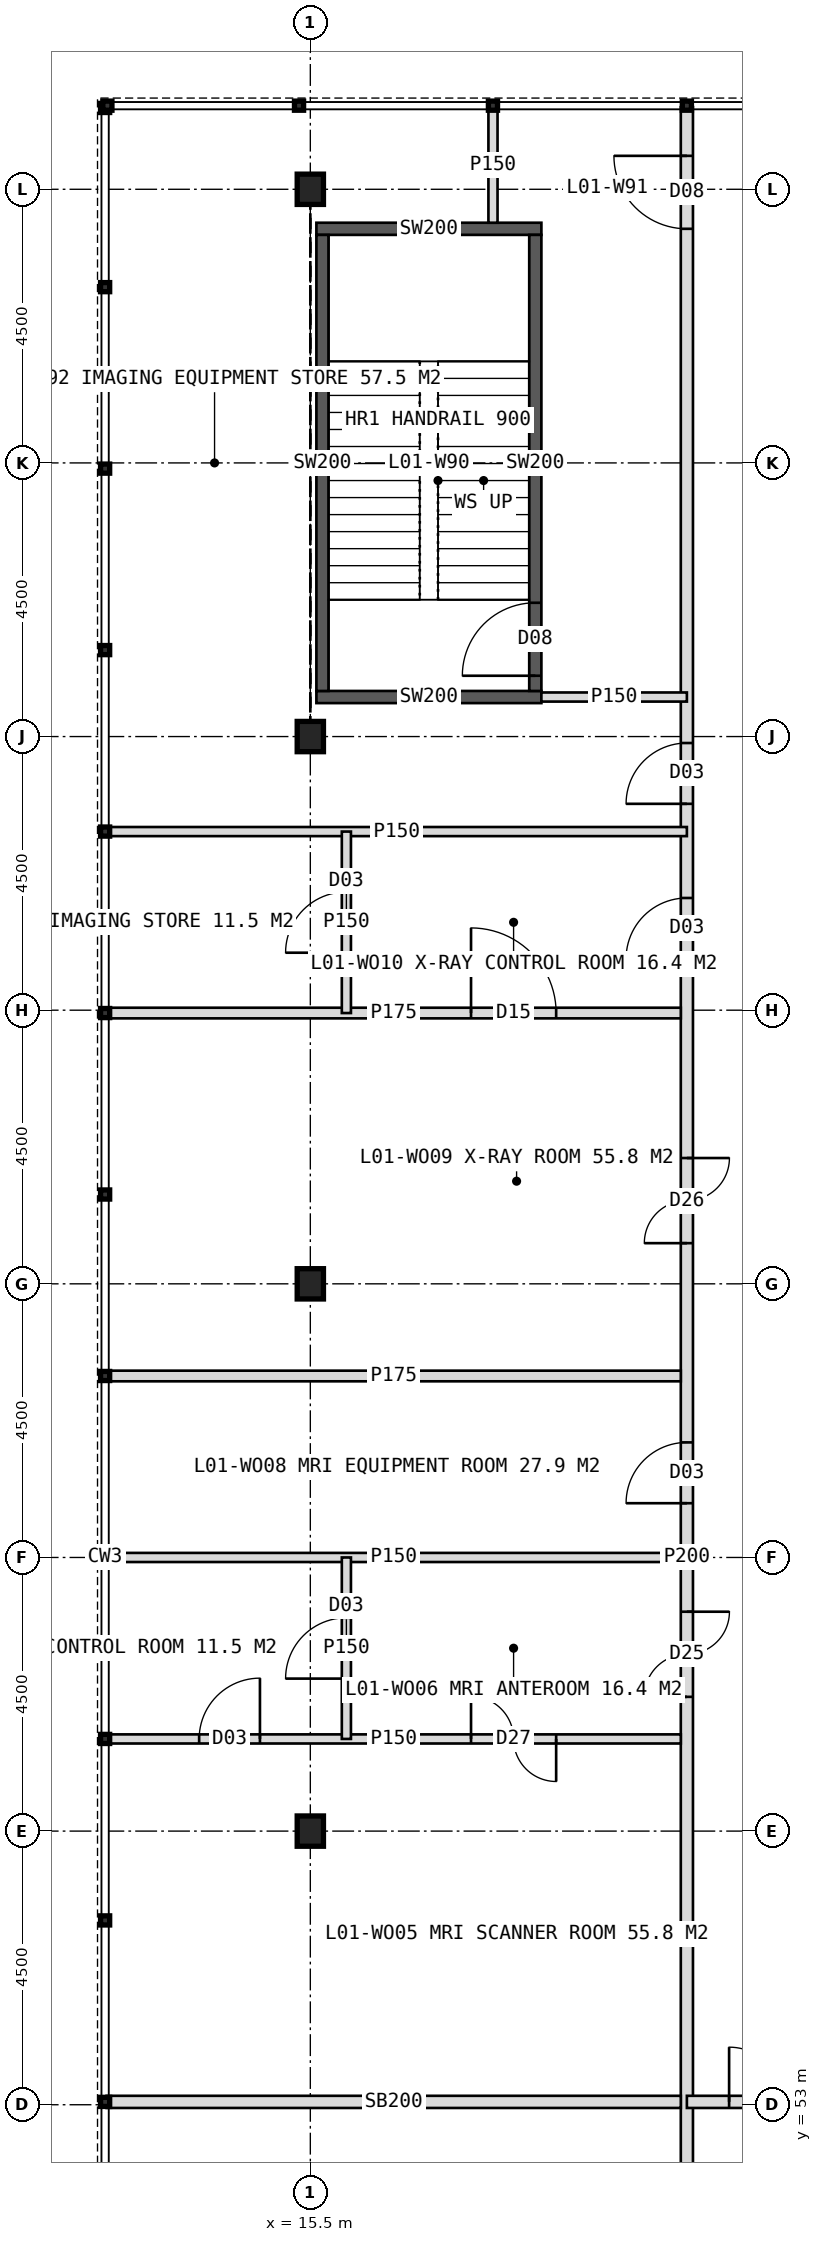
"""IFC4 building model, lengths in metres.
Left out: names, types, materials, properties, quantities, classifications, styles, units other than length and angle.
Written with IfcOpenShell. Run it as: python <this file> out.ifc"""

import sys

from ifc_helpers import new_model, si_unit, direction, frame, frame_2d, origin, origin_2d, place, context, subcontext, project, spatial, rectangle, i_section, extrude, element, fill, save


model = new_model("IFC4")
c1 = context("Model", 3, precision=1e-05, world=origin(), true_north=direction((0.0, 1.0)))
c2 = subcontext(c1, "Body", "Model", "MODEL_VIEW")
j1 = project(units=[si_unit("LENGTHUNIT", "METRE"), si_unit("PLANEANGLEUNIT", "RADIAN")], contexts=[c1])
p1 = place(None, origin())
s1 = spatial("IfcSite", under=j1, at=p1, CompositionType="ELEMENT")
p2 = place(p1, origin())
s2 = spatial("IfcBuilding", under=s1, at=p2, CompositionType="ELEMENT")
p3 = place(p2, frame((0.0, 0.0, 6.0)))
s3 = spatial("IfcBuildingStorey", under=s2, at=p3, CompositionType="ELEMENT", Elevation=6.0)
for number, where, z_axis, x_axis in (
    (1, (15.5, 57.5, 0.0), (0.0, 0.0, 1.0), (1.0, 0.0, 0.0)),
    (2, (15.5, 66.5, 0.0), (0.0, 0.0, 1.0), (1.0, 0.0, 0.0)),
    (3, (15.5, 75.5, 0.0), (0.0, 0.0, 1.0), (1.0, 0.0, 0.0)),
    (4, (15.5, 84.5, 0.0), (0.0, 0.0, 1.0), (1.0, 0.0, 0.0)),
):
    element("IfcColumn", number, at=place(p3, frame(where, z_axis=z_axis, x_axis=x_axis)), inside=s3, PredefinedType="COLUMN", context=c2, shape_type="SweptSolid", body=[
        extrude(i_section(OverallWidth=0.432, OverallDepth=0.498, WebThickness=0.056, FlangeThickness=0.089, FilletRadius=0.015, at=origin_2d()), origin(), (0.0, 0.0, 1.0), 5.0),
    ])
p4 = place(p3, frame((21.693, 38.15, 0.0), z_axis=(0.0, 0.0, 1.0), x_axis=(0.0, 1.0, 0.0)))
e5 = element("IfcWall", 5, at=p4, inside=s3, PredefinedType="PARTITIONING", context=c2, shape_type="SweptSolid", body=[
    extrude(rectangle(XDim=47.7, YDim=0.2, at=frame_2d((23.85, 0.0))), origin(), (0.0, 0.0, 1.0), 4.7),
])
p5 = place(p4, frame((45.7, 0.0, 0.0)))
e6 = element("IfcOpeningElement", 6, at=p5, cuts=e5, PredefinedType="OPENING", context=c2, shape_type="SweptSolid", body=[
    extrude(rectangle(XDim=1.2, YDim=2.1, at=frame_2d((0.6, 1.05))), frame((0.0, 0.11, 0.0), z_axis=(0.0, -1.0, 0.0), x_axis=(1.0, 0.0, 0.0)), (0.0, 0.0, 1.0), 0.22),
])
p6 = place(p4, frame((36.244, 0.0, 0.0)))
e7 = element("IfcOpeningElement", 7, at=p6, cuts=e5, PredefinedType="OPENING", context=c2, shape_type="SweptSolid", body=[
    extrude(rectangle(XDim=1.0, YDim=2.1, at=frame_2d((0.5, 1.05))), frame((0.0, 0.11, 0.0), z_axis=(0.0, -1.0, 0.0), x_axis=(1.0, 0.0, 0.0)), (0.0, 0.0, 1.0), 0.22),
])
p7 = place(p4, frame((2.222, 0.0, 0.0)))
e8 = element("IfcOpeningElement", 8, at=p7, cuts=e5, PredefinedType="OPENING", context=c2, shape_type="SweptSolid", body=[
    extrude(rectangle(XDim=1.4, YDim=2.2, at=frame_2d((0.7, 1.1))), frame((0.0, 0.11, 0.0), z_axis=(0.0, -1.0, 0.0), x_axis=(1.0, 0.0, 0.0)), (0.0, 0.0, 1.0), 0.22),
])
p8 = place(p4, frame((6.836, 0.0, 0.0)))
e9 = element("IfcOpeningElement", 9, at=p8, cuts=e5, PredefinedType="OPENING", context=c2, shape_type="SweptSolid", body=[
    extrude(rectangle(XDim=1.0, YDim=2.1, at=frame_2d((0.5, 1.05))), frame((0.0, 0.11, 0.0), z_axis=(0.0, -1.0, 0.0), x_axis=(1.0, 0.0, 0.0)), (0.0, 0.0, 1.0), 0.22),
])
p9 = place(p4, frame((11.113, 0.0, 0.0)))
e10 = element("IfcOpeningElement", 10, at=p9, cuts=e5, PredefinedType="OPENING", context=c2, shape_type="SweptSolid", body=[
    extrude(rectangle(XDim=1.4, YDim=2.2, at=frame_2d((0.7, 1.1))), frame((0.0, 0.11, 0.0), z_axis=(0.0, -1.0, 0.0), x_axis=(1.0, 0.0, 0.0)), (0.0, 0.0, 1.0), 0.22),
])
p10 = place(p4, frame((21.558, 0.0, 0.0)))
e11 = element("IfcOpeningElement", 11, at=p10, cuts=e5, PredefinedType="OPENING", context=c2, shape_type="SweptSolid", body=[
    extrude(rectangle(XDim=1.4, YDim=2.2, at=frame_2d((0.7, 1.1))), frame((0.0, 0.11, 0.0), z_axis=(0.0, -1.0, 0.0), x_axis=(1.0, 0.0, 0.0)), (0.0, 0.0, 1.0), 0.22),
])
p11 = place(p4, frame((24.742, 0.0, 0.0)))
e12 = element("IfcOpeningElement", 12, at=p11, cuts=e5, PredefinedType="OPENING", context=c2, shape_type="SweptSolid", body=[
    extrude(rectangle(XDim=1.0, YDim=2.1, at=frame_2d((0.5, 1.05))), frame((0.0, 0.11, 0.0), z_axis=(0.0, -1.0, 0.0), x_axis=(1.0, 0.0, 0.0)), (0.0, 0.0, 1.0), 0.22),
])
p12 = place(p4, frame((29.019, 0.0, 0.0)))
e13 = element("IfcOpeningElement", 13, at=p12, cuts=e5, PredefinedType="OPENING", context=c2, shape_type="SweptSolid", body=[
    extrude(rectangle(XDim=1.4, YDim=2.2, at=frame_2d((0.7, 1.1))), frame((0.0, 0.11, 0.0), z_axis=(0.0, -1.0, 0.0), x_axis=(1.0, 0.0, 0.0)), (0.0, 0.0, 1.0), 0.22),
])
p13 = place(p4, frame((33.695, 0.0, 0.0)))
e14 = element("IfcOpeningElement", 14, at=p13, cuts=e5, PredefinedType="OPENING", context=c2, shape_type="SweptSolid", body=[
    extrude(rectangle(XDim=1.0, YDim=2.1, at=frame_2d((0.5, 1.05))), frame((0.0, 0.11, 0.0), z_axis=(0.0, -1.0, 0.0), x_axis=(1.0, 0.0, 0.0)), (0.0, 0.0, 1.0), 0.22),
])
p14 = place(p3, frame((21.693, 53.047, 0.0), z_axis=(0.0, 0.0, 1.0), x_axis=(1.0, 0.0, 0.0)))
e15 = element("IfcWall", 15, at=p14, inside=s3, PredefinedType="SOLIDWALL", context=c2, shape_type="SweptSolid", body=[
    extrude(rectangle(XDim=3.189, YDim=0.2, at=frame_2d((1.594, 0.0))), origin(), (0.0, 0.0, 1.0), 4.7),
])
p15 = place(p14, frame((0.695, 0.0, 0.0)))
e16 = element("IfcOpeningElement", 16, at=p15, cuts=e15, PredefinedType="OPENING", context=c2, shape_type="SweptSolid", body=[
    extrude(rectangle(XDim=1.8, YDim=2.2, at=frame_2d((0.9, 1.1))), frame((0.0, 0.11, 0.0), z_axis=(0.0, -1.0, 0.0), x_axis=(1.0, 0.0, 0.0)), (0.0, 0.0, 1.0), 0.22),
])
for number, where, z_axis, x_axis in (
    (17, (15.6, 76.15, 0.0), (0.0, 0.0, 1.0), (1.0, 0.0, 0.0)),
    (18, (15.6, 83.85, 0.0), (0.0, 0.0, 1.0), (1.0, 0.0, 0.0)),
):
    element("IfcWall", number, at=place(p3, frame(where, z_axis=z_axis, x_axis=x_axis)), inside=s3, PredefinedType="SOLIDWALL", context=c2, shape_type="SweptSolid", body=[
        extrude(rectangle(XDim=3.7, YDim=0.2, at=frame_2d((1.85, 0.0))), origin(), (0.0, 0.0, 1.0), 4.7),
    ])
p16 = place(p3, frame((15.7, 76.25, 0.0), z_axis=(0.0, 0.0, 1.0), x_axis=(0.0, 1.0, 0.0)))
e19 = element("IfcWall", 19, at=p16, inside=s3, PredefinedType="SOLIDWALL", context=c2, shape_type="SweptSolid", body=[
    extrude(rectangle(XDim=7.5, YDim=0.2, at=frame_2d((3.75, 0.0))), origin(), (0.0, 0.0, 1.0), 4.7),
])
p17 = place(p3, frame((19.2, 76.25, 0.0), z_axis=(0.0, 0.0, 1.0), x_axis=(0.0, 1.0, 0.0)))
e20 = element("IfcWall", 20, at=p17, inside=s3, PredefinedType="SOLIDWALL", context=c2, shape_type="SweptSolid", body=[
    extrude(rectangle(XDim=7.5, YDim=0.2, at=frame_2d((3.75, 0.0))), origin(), (0.0, 0.0, 1.0), 4.7),
])
p18 = place(p17, frame((0.25, 0.0, 0.0)))
e21 = element("IfcOpeningElement", 21, at=p18, cuts=e20, PredefinedType="OPENING", context=c2, shape_type="SweptSolid", body=[
    extrude(rectangle(XDim=1.2, YDim=2.1, at=frame_2d((0.6, 1.05))), frame((0.0, 0.11, 0.0), z_axis=(0.0, -1.0, 0.0), x_axis=(1.0, 0.0, 0.0)), (0.0, 0.0, 1.0), 0.22),
])
p19 = place(p3, frame((19.3, 76.15, 0.0), z_axis=(0.0, 0.0, 1.0), x_axis=(1.0, 0.0, 0.0)))
e22 = element("IfcWall", 22, at=p19, inside=s3, PredefinedType="PARTITIONING", context=c2, shape_type="SweptSolid", body=[
    extrude(rectangle(XDim=2.393, YDim=0.15, at=frame_2d((1.197, 0.0))), origin(), (0.0, 0.0, 1.0), 4.7),
])
p20 = place(p3, frame((18.504, 83.95, 0.0), z_axis=(0.0, 0.0, 1.0), x_axis=(0.0, 1.0, 0.0)))
e23 = element("IfcWall", 23, at=p20, inside=s3, PredefinedType="PARTITIONING", context=c2, shape_type="SweptSolid", body=[
    extrude(rectangle(XDim=1.9, YDim=0.15, at=frame_2d((0.95, 0.0))), origin(), (0.0, 0.0, 1.0), 4.7),
])
p21 = place(p3, frame((12.15, 73.938, 0.0), z_axis=(0.0, 0.0, 1.0), x_axis=(1.0, 0.0, 0.0)))
e24 = element("IfcWall", 24, at=p21, inside=s3, PredefinedType="PARTITIONING", context=c2, shape_type="SweptSolid", body=[
    extrude(rectangle(XDim=9.543, YDim=0.15, at=frame_2d((4.771, 0.0))), origin(), (0.0, 0.0, 1.0), 4.7),
])
p22 = place(p3, frame((12.15, 53.047, 0.0), z_axis=(0.0, 0.0, 1.0), x_axis=(1.0, 0.0, 0.0)))
e25 = element("IfcWall", 25, at=p22, inside=s3, PredefinedType="SOLIDWALL", context=c2, shape_type="SweptSolid", body=[
    extrude(rectangle(XDim=9.443, YDim=0.2, at=frame_2d((4.722, 0.0))), origin(), (0.0, 0.0, 1.0), 4.7),
])
p23 = place(p3, frame((12.15, 59.016, 0.0), z_axis=(0.0, 0.0, 1.0), x_axis=(1.0, 0.0, 0.0)))
e26 = element("IfcWall", 26, at=p23, inside=s3, PredefinedType="PARTITIONING", context=c2, shape_type="SweptSolid", body=[
    extrude(rectangle(XDim=9.443, YDim=0.15, at=frame_2d((4.722, 0.0))), origin(), (0.0, 0.0, 1.0), 4.7),
])
p24 = place(p23, frame((5.993, 0.0, 0.0)))
e27 = element("IfcOpeningElement", 27, at=p24, cuts=e26, PredefinedType="OPENING", context=c2, shape_type="SweptSolid", body=[
    extrude(rectangle(XDim=1.4, YDim=2.2, at=frame_2d((0.7, 1.1))), frame((0.0, 0.085, 0.0), z_axis=(0.0, -1.0, 0.0), x_axis=(1.0, 0.0, 0.0)), (0.0, 0.0, 1.0), 0.17),
])
p25 = place(p23, frame((1.521, 0.0, 0.0)))
e28 = element("IfcOpeningElement", 28, at=p25, cuts=e26, PredefinedType="OPENING", context=c2, shape_type="SweptSolid", body=[
    extrude(rectangle(XDim=1.0, YDim=2.1, at=frame_2d((0.5, 1.05))), frame((0.0, 0.085, 0.0), z_axis=(0.0, -1.0, 0.0), x_axis=(1.0, 0.0, 0.0)), (0.0, 0.0, 1.0), 0.17),
])
p26 = place(p3, frame((12.15, 62.0, 0.0), z_axis=(0.0, 0.0, 1.0), x_axis=(1.0, 0.0, 0.0)))
e29 = element("IfcWall", 29, at=p26, inside=s3, PredefinedType="PARTITIONING", context=c2, shape_type="SweptSolid", body=[
    extrude(rectangle(XDim=9.443, YDim=0.15, at=frame_2d((4.722, 0.0))), origin(), (0.0, 0.0, 1.0), 4.7),
])
p27 = place(p3, frame((12.15, 64.984, 0.0), z_axis=(0.0, 0.0, 1.0), x_axis=(1.0, 0.0, 0.0)))
e30 = element("IfcWall", 30, at=p27, inside=s3, PredefinedType="PARTITIONING", context=c2, shape_type="SweptSolid", body=[
    extrude(rectangle(XDim=9.443, YDim=0.175, at=frame_2d((4.722, 0.0))), origin(), (0.0, 0.0, 1.0), 4.7),
])
p28 = place(p3, frame((12.15, 70.953, 0.0), z_axis=(0.0, 0.0, 1.0), x_axis=(1.0, 0.0, 0.0)))
e31 = element("IfcWall", 31, at=p28, inside=s3, PredefinedType="PARTITIONING", context=c2, shape_type="SweptSolid", body=[
    extrude(rectangle(XDim=9.443, YDim=0.175, at=frame_2d((4.722, 0.0))), origin(), (0.0, 0.0, 1.0), 4.7),
])
p29 = place(p28, frame((5.993, 0.0, 0.0)))
e32 = element("IfcOpeningElement", 32, at=p29, cuts=e31, PredefinedType="OPENING", context=c2, shape_type="SweptSolid", body=[
    extrude(rectangle(XDim=1.4, YDim=2.1, at=frame_2d((0.7, 1.05))), frame((0.0, 0.097, 0.0), z_axis=(0.0, -1.0, 0.0), x_axis=(1.0, 0.0, 0.0)), (0.0, 0.0, 1.0), 0.195),
])
p30 = place(p3, frame((16.093, 59.016, 0.0), z_axis=(0.0, 0.0, 1.0), x_axis=(0.0, 1.0, 0.0)))
e33 = element("IfcWall", 33, at=p30, inside=s3, PredefinedType="PARTITIONING", context=c2, shape_type="SweptSolid", body=[
    extrude(rectangle(XDim=2.984, YDim=0.15, at=frame_2d((1.492, 0.0))), origin(), (0.0, 0.0, 1.0), 4.7),
])
p31 = place(p30, frame((0.992, 0.0, 0.0)))
e34 = element("IfcOpeningElement", 34, at=p31, cuts=e33, PredefinedType="OPENING", context=c2, shape_type="SweptSolid", body=[
    extrude(rectangle(XDim=1.0, YDim=2.1, at=frame_2d((0.5, 1.05))), frame((0.0, 0.085, 0.0), z_axis=(0.0, -1.0, 0.0), x_axis=(1.0, 0.0, 0.0)), (0.0, 0.0, 1.0), 0.17),
])
p32 = place(p3, frame((16.093, 70.953, 0.0), z_axis=(0.0, 0.0, 1.0), x_axis=(0.0, 1.0, 0.0)))
e35 = element("IfcWall", 35, at=p32, inside=s3, PredefinedType="PARTITIONING", context=c2, shape_type="SweptSolid", body=[
    extrude(rectangle(XDim=2.984, YDim=0.15, at=frame_2d((1.492, 0.0))), origin(), (0.0, 0.0, 1.0), 4.7),
])
p33 = place(p32, frame((0.992, 0.0, 0.0)))
e36 = element("IfcOpeningElement", 36, at=p33, cuts=e35, PredefinedType="OPENING", context=c2, shape_type="SweptSolid", body=[
    extrude(rectangle(XDim=1.0, YDim=2.1, at=frame_2d((0.5, 1.05))), frame((0.0, 0.085, 0.0), z_axis=(0.0, -1.0, 0.0), x_axis=(1.0, 0.0, 0.0)), (0.0, 0.0, 1.0), 0.17),
])
p34 = place(p15, origin())
e37 = element("IfcDoor", 37, at=p34, inside=s3, OperationType="DOUBLE_DOOR_DOUBLE_SWING", PredefinedType="DOOR", context=c2, shape_type="SweptSolid", body=[
    extrude(rectangle(XDim=1.8, YDim=2.2, at=frame_2d((0.9, 1.1))), frame((0.0, 0.025, 0.0), z_axis=(0.0, -1.0, 0.0), x_axis=(1.0, 0.0, 0.0)), (0.0, 0.0, 1.0), 0.05),
])
fill(e16, e37)
p35 = place(p18, origin())
e38 = element("IfcDoor", 38, at=p35, inside=s3, OperationType="SINGLE_SWING_LEFT", PredefinedType="DOOR", context=c2, shape_type="SweptSolid", body=[
    extrude(rectangle(XDim=1.2, YDim=2.1, at=frame_2d((0.6, 1.05))), frame((0.0, 0.025, 0.0), z_axis=(0.0, -1.0, 0.0), x_axis=(1.0, 0.0, 0.0)), (0.0, 0.0, 1.0), 0.05),
])
fill(e21, e38)
p36 = place(p5, origin())
e39 = element("IfcDoor", 39, at=p36, inside=s3, OperationType="SINGLE_SWING_RIGHT", PredefinedType="DOOR", context=c2, shape_type="SweptSolid", body=[
    extrude(rectangle(XDim=1.2, YDim=2.1, at=frame_2d((0.6, 1.05))), frame((0.0, 0.025, 0.0), z_axis=(0.0, -1.0, 0.0), x_axis=(1.0, 0.0, 0.0)), (0.0, 0.0, 1.0), 0.05),
])
fill(e6, e39)
p37 = place(p6, origin())
e40 = element("IfcDoor", 40, at=p37, inside=s3, OperationType="SINGLE_SWING_LEFT", PredefinedType="DOOR", context=c2, shape_type="SweptSolid", body=[
    extrude(rectangle(XDim=1.0, YDim=2.1, at=frame_2d((0.5, 1.05))), frame((0.0, 0.025, 0.0), z_axis=(0.0, -1.0, 0.0), x_axis=(1.0, 0.0, 0.0)), (0.0, 0.0, 1.0), 0.05),
])
fill(e7, e40)
p38 = place(p10, origin())
e41 = element("IfcDoor", 41, at=p38, inside=s3, OperationType="DOUBLE_DOOR_SINGLE_SWING", PredefinedType="DOOR", context=c2, shape_type="SweptSolid", body=[
    extrude(rectangle(XDim=1.4, YDim=2.2, at=frame_2d((0.7, 1.1))), frame((0.0, 0.025, 0.0), z_axis=(0.0, -1.0, 0.0), x_axis=(1.0, 0.0, 0.0)), (0.0, 0.0, 1.0), 0.05),
])
fill(e11, e41)
p39 = place(p24, origin())
e42 = element("IfcDoor", 42, at=p39, inside=s3, OperationType="DOUBLE_DOOR_SINGLE_SWING", PredefinedType="DOOR", context=c2, shape_type="SweptSolid", body=[
    extrude(rectangle(XDim=1.4, YDim=2.2, at=frame_2d((0.7, 1.1))), frame((0.0, 0.025, 0.0), z_axis=(0.0, -1.0, 0.0), x_axis=(1.0, 0.0, 0.0)), (0.0, 0.0, 1.0), 0.05),
])
fill(e27, e42)
p40 = place(p25, origin())
e43 = element("IfcDoor", 43, at=p40, inside=s3, OperationType="SINGLE_SWING_RIGHT", PredefinedType="DOOR", context=c2, shape_type="SweptSolid", body=[
    extrude(rectangle(XDim=1.0, YDim=2.1, at=frame_2d((0.5, 1.05))), frame((0.0, 0.025, 0.0), z_axis=(0.0, -1.0, 0.0), x_axis=(1.0, 0.0, 0.0)), (0.0, 0.0, 1.0), 0.05),
])
fill(e28, e43)
p41 = place(p31, origin())
e44 = element("IfcDoor", 44, at=p41, inside=s3, OperationType="SINGLE_SWING_LEFT", PredefinedType="DOOR", context=c2, shape_type="SweptSolid", body=[
    extrude(rectangle(XDim=1.0, YDim=2.1, at=frame_2d((0.5, 1.05))), frame((0.0, 0.025, 0.0), z_axis=(0.0, -1.0, 0.0), x_axis=(1.0, 0.0, 0.0)), (0.0, 0.0, 1.0), 0.05),
])
fill(e34, e44)
p42 = place(p11, origin())
e45 = element("IfcDoor", 45, at=p42, inside=s3, OperationType="SINGLE_SWING_LEFT", PredefinedType="DOOR", context=c2, shape_type="SweptSolid", body=[
    extrude(rectangle(XDim=1.0, YDim=2.1, at=frame_2d((0.5, 1.05))), frame((0.0, 0.025, 0.0), z_axis=(0.0, -1.0, 0.0), x_axis=(1.0, 0.0, 0.0)), (0.0, 0.0, 1.0), 0.05),
])
fill(e12, e45)
p43 = place(p12, origin())
e46 = element("IfcDoor", 46, at=p43, inside=s3, OperationType="DOUBLE_DOOR_SINGLE_SWING", PredefinedType="DOOR", context=c2, shape_type="SweptSolid", body=[
    extrude(rectangle(XDim=1.4, YDim=2.2, at=frame_2d((0.7, 1.1))), frame((0.0, 0.025, 0.0), z_axis=(0.0, -1.0, 0.0), x_axis=(1.0, 0.0, 0.0)), (0.0, 0.0, 1.0), 0.05),
])
fill(e13, e46)
p44 = place(p13, origin())
e47 = element("IfcDoor", 47, at=p44, inside=s3, OperationType="SINGLE_SWING_LEFT", PredefinedType="DOOR", context=c2, shape_type="SweptSolid", body=[
    extrude(rectangle(XDim=1.0, YDim=2.1, at=frame_2d((0.5, 1.05))), frame((0.0, 0.025, 0.0), z_axis=(0.0, -1.0, 0.0), x_axis=(1.0, 0.0, 0.0)), (0.0, 0.0, 1.0), 0.05),
])
fill(e14, e47)
p45 = place(p29, origin())
e48 = element("IfcDoor", 48, at=p45, inside=s3, OperationType="SINGLE_SWING_LEFT", PredefinedType="DOOR", context=c2, shape_type="SweptSolid", body=[
    extrude(rectangle(XDim=1.4, YDim=2.1, at=frame_2d((0.7, 1.05))), frame((0.0, 0.025, 0.0), z_axis=(0.0, -1.0, 0.0), x_axis=(1.0, 0.0, 0.0)), (0.0, 0.0, 1.0), 0.05),
])
fill(e32, e48)
p46 = place(p33, origin())
e49 = element("IfcDoor", 49, at=p46, inside=s3, OperationType="SINGLE_SWING_LEFT", PredefinedType="DOOR", context=c2, shape_type="SweptSolid", body=[
    extrude(rectangle(XDim=1.0, YDim=2.1, at=frame_2d((0.5, 1.05))), frame((0.0, 0.025, 0.0), z_axis=(0.0, -1.0, 0.0), x_axis=(1.0, 0.0, 0.0)), (0.0, 0.0, 1.0), 0.05),
])
fill(e36, e49)
save(model, sys.argv[1])
